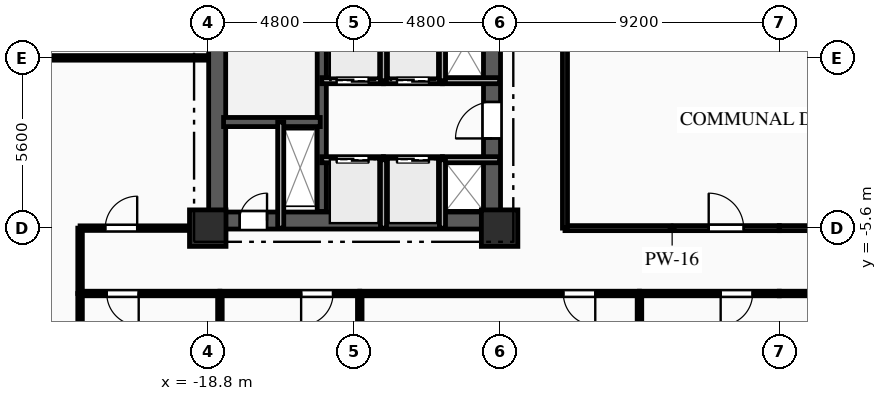
"""IFC4 building model, lengths in metres.
Left out: names, types, materials, properties, quantities, classifications, styles, units other than length and angle.
Written with IfcOpenShell. Run it as: python <this file> out.ifc"""

import sys

from ifc_helpers import new_model, si_unit, direction, frame, frame_2d, origin, origin_2d, place, context, subcontext, project, spatial, rectangle, extrude, element, fill, save


model = new_model("IFC4")
c1 = context("Model", 3, precision=1e-05, world=origin(), true_north=direction((0.0, 1.0)))
c2 = subcontext(c1, "Body", "Model", "MODEL_VIEW")
j1 = project(units=[si_unit("LENGTHUNIT", "METRE"), si_unit("PLANEANGLEUNIT", "RADIAN")], contexts=[c1])
p1 = place(None, origin())
s1 = spatial("IfcSite", under=j1, at=p1, CompositionType="ELEMENT")
p2 = place(p1, origin())
s2 = spatial("IfcBuilding", under=s1, at=p2, CompositionType="ELEMENT")
p3 = place(p2, frame((0.0, 0.0, 27.0)))
s3 = spatial("IfcBuildingStorey", under=s2, at=p3, CompositionType="ELEMENT", Elevation=27.0)
for number, where, z_axis, x_axis in (
    (1, (-18.8, -5.6, 0.0), (0.0, 0.0, 1.0), (1.0, 0.0, 0.0)),
    (2, (-9.2, -5.6, 0.0), (0.0, 0.0, 1.0), (1.0, 0.0, 0.0)),
):
    element("IfcColumn", number, at=place(p3, frame(where, z_axis=z_axis, x_axis=x_axis)), inside=s3, PredefinedType="COLUMN", context=c2, shape_type="SweptSolid", body=[
        extrude(rectangle(XDim=1.2, YDim=1.2, at=origin_2d()), origin(), (0.0, 0.0, 1.0), 3.35),
    ])
p4 = place(p3, frame((-18.8, -5.35, 0.0), z_axis=(0.0, 0.0, 1.0), x_axis=(1.0, 0.0, 0.0)))
e3 = element("IfcWall", 3, at=p4, inside=s3, PredefinedType="SHEAR", context=c2, shape_type="SweptSolid", body=[
    extrude(rectangle(XDim=9.6, YDim=0.56, at=frame_2d((4.8, 0.0))), origin(), (0.0, 0.0, 1.0), 3.035),
])
p5 = place(p4, frame((1.05, 0.0, 0.0)))
e4 = element("IfcOpeningElement", 4, at=p5, cuts=e3, PredefinedType="OPENING", context=c2, shape_type="SweptSolid", body=[
    extrude(rectangle(XDim=0.9, YDim=2.1, at=frame_2d((0.45, 1.05))), frame((0.0, 0.29, 0.0), z_axis=(0.0, -1.0, 0.0), x_axis=(1.0, 0.0, 0.0)), (0.0, 0.0, 1.0), 0.58),
])
p6 = place(p3, frame((-18.49, -5.05, 0.0), z_axis=(0.0, 0.0, 1.0), x_axis=(0.0, 1.0, 0.0)))
e5 = element("IfcWall", 5, at=p6, inside=s3, PredefinedType="SHEAR", context=c2, shape_type="SweptSolid", body=[
    extrude(rectangle(XDim=10.1, YDim=0.56, at=frame_2d((5.05, 0.0))), origin(), (0.0, 0.0, 1.0), 3.035),
])
p7 = place(p3, frame((-9.45, -5.05, 0.0), z_axis=(0.0, 0.0, 1.0), x_axis=(0.0, 1.0, 0.0)))
e6 = element("IfcWall", 6, at=p7, inside=s3, PredefinedType="SHEAR", context=c2, shape_type="SweptSolid", body=[
    extrude(rectangle(XDim=10.1, YDim=0.56, at=frame_2d((5.05, 0.0))), origin(), (0.0, 0.0, 1.0), 3.035),
])
p8 = place(p7, frame((7.15, 0.0, 0.0)))
e7 = element("IfcOpeningElement", 7, at=p8, cuts=e6, PredefinedType="OPENING", context=c2, shape_type="SweptSolid", body=[
    extrude(rectangle(XDim=0.9, YDim=2.1, at=frame_2d((0.45, 1.05))), frame((0.0, 0.29, 0.0), z_axis=(0.0, -1.0, 0.0), x_axis=(1.0, 0.0, 0.0)), (0.0, 0.0, 1.0), 0.58),
])
p9 = place(p7, frame((2.4, 0.0, 0.0)))
e8 = element("IfcOpeningElement", 8, at=p9, cuts=e6, PredefinedType="OPENING", context=c2, shape_type="SweptSolid", body=[
    extrude(rectangle(XDim=1.2, YDim=2.15, at=frame_2d((0.6, 1.075))), frame((0.0, 0.29, 0.0), z_axis=(0.0, -1.0, 0.0), x_axis=(1.0, 0.0, 0.0)), (0.0, 0.0, 1.0), 0.58),
])
p10 = place(p3, frame((-15.05, -5.05, 0.0), z_axis=(0.0, 0.0, 1.0), x_axis=(0.0, 1.0, 0.0)))
e9 = element("IfcWall", 9, at=p10, inside=s3, PredefinedType="SHEAR", context=c2, shape_type="SweptSolid", body=[
    extrude(rectangle(XDim=10.1, YDim=0.3, at=frame_2d((5.05, 0.0))), origin(), (0.0, 0.0, 1.0), 3.035),
])
p11 = place(p3, frame((-18.28, -2.11, 0.0), z_axis=(0.0, 0.0, 1.0), x_axis=(1.0, 0.0, 0.0)))
e10 = element("IfcWall", 10, at=p11, inside=s3, PredefinedType="SHEAR", context=c2, shape_type="SweptSolid", body=[
    extrude(rectangle(XDim=3.18, YDim=0.3, at=frame_2d((1.59, 0.0))), origin(), (0.0, 0.0, 1.0), 3.035),
])
p12 = place(p3, frame((-16.4, -5.6, 0.0), z_axis=(0.0, 0.0, 1.0), x_axis=(0.0, 1.0, 0.0)))
e11 = element("IfcWall", 11, at=p12, inside=s3, PredefinedType="PARTITIONING", context=c2, shape_type="SweptSolid", body=[
    extrude(rectangle(XDim=3.49, YDim=0.2, at=frame_2d((1.745, 0.0))), origin(), (0.0, 0.0, 1.0), 3.035),
])
p13 = place(p3, frame((-15.05, -3.35, 0.0), z_axis=(0.0, 0.0, 1.0), x_axis=(1.0, 0.0, 0.0)))
e12 = element("IfcWall", 12, at=p13, inside=s3, PredefinedType="PARTITIONING", context=c2, shape_type="SweptSolid", body=[
    extrude(rectangle(XDim=2.03, YDim=0.2, at=frame_2d((1.015, 0.0))), origin(), (0.0, 0.0, 1.0), 3.035),
])
p14 = place(p13, frame((0.49, 0.0, 0.0)))
e13 = element("IfcOpeningElement", 13, at=p14, cuts=e12, PredefinedType="OPENING", context=c2, shape_type="SweptSolid", body=[
    extrude(rectangle(XDim=1.05, YDim=2.1, at=frame_2d((0.525, 1.05))), frame((0.0, 0.11, 0.0), z_axis=(0.0, -1.0, 0.0), x_axis=(1.0, 0.0, 0.0)), (0.0, 0.0, 1.0), 0.22),
])
p15 = place(p3, frame((-13.02, -3.35, 0.0), z_axis=(0.0, 0.0, 1.0), x_axis=(1.0, 0.0, 0.0)))
e14 = element("IfcWall", 14, at=p15, inside=s3, PredefinedType="PARTITIONING", context=c2, shape_type="SweptSolid", body=[
    extrude(rectangle(XDim=1.94, YDim=0.2, at=frame_2d((0.97, 0.0))), origin(), (0.0, 0.0, 1.0), 3.035),
])
p16 = place(p15, frame((0.445, 0.0, 0.0)))
e15 = element("IfcOpeningElement", 15, at=p16, cuts=e14, PredefinedType="OPENING", context=c2, shape_type="SweptSolid", body=[
    extrude(rectangle(XDim=1.05, YDim=2.1, at=frame_2d((0.525, 1.05))), frame((0.0, 0.11, 0.0), z_axis=(0.0, -1.0, 0.0), x_axis=(1.0, 0.0, 0.0)), (0.0, 0.0, 1.0), 0.22),
])
p17 = place(p3, frame((-11.08, -3.35, 0.0), z_axis=(0.0, 0.0, 1.0), x_axis=(1.0, 0.0, 0.0)))
e16 = element("IfcWall", 16, at=p17, inside=s3, PredefinedType="PARTITIONING", context=c2, shape_type="SweptSolid", body=[
    extrude(rectangle(XDim=1.88, YDim=0.2, at=frame_2d((0.94, 0.0))), origin(), (0.0, 0.0, 1.0), 2.75),
])
p18 = place(p3, frame((-13.02, -0.75, 0.0), z_axis=(0.0, 0.0, 1.0), x_axis=(-1.0, 0.0, 0.0)))
e17 = element("IfcWall", 17, at=p18, inside=s3, PredefinedType="PARTITIONING", context=c2, shape_type="SweptSolid", body=[
    extrude(rectangle(XDim=2.03, YDim=0.2, at=frame_2d((1.015, 0.0))), origin(), (0.0, 0.0, 1.0), 3.035),
])
p19 = place(p18, frame((0.49, 0.0, 0.0)))
e18 = element("IfcOpeningElement", 18, at=p19, cuts=e17, PredefinedType="OPENING", context=c2, shape_type="SweptSolid", body=[
    extrude(rectangle(XDim=1.05, YDim=2.1, at=frame_2d((0.525, 1.05))), frame((0.0, 0.11, 0.0), z_axis=(0.0, -1.0, 0.0), x_axis=(1.0, 0.0, 0.0)), (0.0, 0.0, 1.0), 0.22),
])
p20 = place(p3, frame((-11.08, -0.75, 0.0), z_axis=(0.0, 0.0, 1.0), x_axis=(-1.0, 0.0, 0.0)))
e19 = element("IfcWall", 19, at=p20, inside=s3, PredefinedType="PARTITIONING", context=c2, shape_type="SweptSolid", body=[
    extrude(rectangle(XDim=1.94, YDim=0.2, at=frame_2d((0.97, 0.0))), origin(), (0.0, 0.0, 1.0), 3.035),
])
p21 = place(p20, frame((0.445, 0.0, 0.0)))
e20 = element("IfcOpeningElement", 20, at=p21, cuts=e19, PredefinedType="OPENING", context=c2, shape_type="SweptSolid", body=[
    extrude(rectangle(XDim=1.05, YDim=2.1, at=frame_2d((0.525, 1.05))), frame((0.0, 0.11, 0.0), z_axis=(0.0, -1.0, 0.0), x_axis=(1.0, 0.0, 0.0)), (0.0, 0.0, 1.0), 0.22),
])
p22 = place(p3, frame((-9.2, -0.75, 0.0), z_axis=(0.0, 0.0, 1.0), x_axis=(-1.0, 0.0, 0.0)))
e21 = element("IfcWall", 21, at=p22, inside=s3, PredefinedType="PARTITIONING", context=c2, shape_type="SweptSolid", body=[
    extrude(rectangle(XDim=1.88, YDim=0.2, at=frame_2d((0.94, 0.0))), origin(), (0.0, 0.0, 1.0), 3.035),
])
for number, where, z_axis, x_axis in (
    (22, (-13.02, -5.6, 0.0), (0.0, 0.0, 1.0), (0.0, 1.0, 0.0)),
    (23, (-11.08, -5.6, 0.0), (0.0, 0.0, 1.0), (0.0, 1.0, 0.0)),
):
    element("IfcWall", number, at=place(p3, frame(where, z_axis=z_axis, x_axis=x_axis)), inside=s3, PredefinedType="PARTITIONING", context=c2, shape_type="SweptSolid", body=[
        extrude(rectangle(XDim=2.25, YDim=0.2, at=frame_2d((1.125, 0.0))), origin(), (0.0, 0.0, 1.0), 3.035),
    ])
for number, where, z_axis, x_axis in (
    (24, (-13.02, -0.75, 0.0), (0.0, 0.0, 1.0), (0.0, 1.0, 0.0)),
    (25, (-11.08, -0.75, 0.0), (0.0, 0.0, 1.0), (0.0, 1.0, 0.0)),
):
    element("IfcWall", number, at=place(p3, frame(where, z_axis=z_axis, x_axis=x_axis)), inside=s3, PredefinedType="PARTITIONING", context=c2, shape_type="SweptSolid", body=[
        extrude(rectangle(XDim=2.3, YDim=0.2, at=frame_2d((1.15, 0.0))), origin(), (0.0, 0.0, 1.0), 3.035),
    ])
p23 = place(p3, frame((-23.0, -5.6, 0.0), z_axis=(0.0, 0.0, 1.0), x_axis=(1.0, 0.0, 0.0)))
e26 = element("IfcWall", 26, at=p23, inside=s3, PredefinedType="PARTITIONING", context=c2, shape_type="SweptSolid", body=[
    extrude(rectangle(XDim=4.2, YDim=0.15, at=frame_2d((2.1, 0.0))), origin(), (0.0, 0.0, 1.0), 3.035),
])
p24 = place(p23, frame((0.829, 0.0, 0.0)))
e27 = element("IfcOpeningElement", 27, at=p24, cuts=e26, PredefinedType="OPENING", context=c2, shape_type="SweptSolid", body=[
    extrude(rectangle(XDim=1.05, YDim=2.15, at=frame_2d((0.525, 1.075))), frame((0.0, 0.085, 0.0), z_axis=(0.0, -1.0, 0.0), x_axis=(1.0, 0.0, 0.0)), (0.0, 0.0, 1.0), 0.17),
])
p25 = place(p3, frame((-23.0, -7.75, 0.0), z_axis=(0.0, 0.0, 1.0), x_axis=(0.0, 1.0, 0.0)))
e28 = element("IfcWall", 28, at=p25, inside=s3, PredefinedType="PARTITIONING", context=c2, shape_type="SweptSolid", body=[
    extrude(rectangle(XDim=2.15, YDim=0.15, at=frame_2d((1.075, 0.0))), origin(), (0.0, 0.0, 1.0), 3.035),
])
p26 = place(p3, frame((-18.4, -7.75, 0.0), z_axis=(0.0, 0.0, 1.0), x_axis=(-1.0, 0.0, 0.0)))
e29 = element("IfcWall", 29, at=p26, inside=s3, PredefinedType="PARTITIONING", context=c2, shape_type="SweptSolid", body=[
    extrude(rectangle(XDim=4.6, YDim=0.15, at=frame_2d((2.3, 0.0))), origin(), (0.0, 0.0, 1.0), 3.035),
])
p27 = place(p26, frame((2.671, 0.0, 0.0)))
e30 = element("IfcOpeningElement", 30, at=p27, cuts=e29, PredefinedType="OPENING", context=c2, shape_type="SweptSolid", body=[
    extrude(rectangle(XDim=1.05, YDim=2.15, at=frame_2d((0.525, 1.075))), frame((0.0, 0.085, 0.0), z_axis=(0.0, -1.0, 0.0), x_axis=(1.0, 0.0, 0.0)), (0.0, 0.0, 1.0), 0.17),
])
p28 = place(p3, frame((-13.8, -7.75, 0.0), z_axis=(0.0, 0.0, 1.0), x_axis=(-1.0, 0.0, 0.0)))
e31 = element("IfcWall", 31, at=p28, inside=s3, PredefinedType="PARTITIONING", context=c2, shape_type="SweptSolid", body=[
    extrude(rectangle(XDim=4.6, YDim=0.15, at=frame_2d((2.3, 0.0))), origin(), (0.0, 0.0, 1.0), 3.035),
])
p29 = place(p28, frame((0.879, 0.0, 0.0)))
e32 = element("IfcOpeningElement", 32, at=p29, cuts=e31, PredefinedType="OPENING", context=c2, shape_type="SweptSolid", body=[
    extrude(rectangle(XDim=1.05, YDim=2.15, at=frame_2d((0.525, 1.075))), frame((0.0, 0.085, 0.0), z_axis=(0.0, -1.0, 0.0), x_axis=(1.0, 0.0, 0.0)), (0.0, 0.0, 1.0), 0.17),
])
p30 = place(p3, frame((-4.6, -7.75, 0.0), z_axis=(0.0, 0.0, 1.0), x_axis=(-1.0, 0.0, 0.0)))
e33 = element("IfcWall", 33, at=p30, inside=s3, PredefinedType="PARTITIONING", context=c2, shape_type="SweptSolid", body=[
    extrude(rectangle(XDim=9.2, YDim=0.15, at=frame_2d((4.6, 0.0))), origin(), (0.0, 0.0, 1.0), 3.035),
])
p31 = place(p30, frame((1.454, 0.0, 0.0)))
e34 = element("IfcOpeningElement", 34, at=p31, cuts=e33, PredefinedType="OPENING", context=c2, shape_type="SweptSolid", body=[
    extrude(rectangle(XDim=1.05, YDim=2.15, at=frame_2d((0.525, 1.075))), frame((0.0, 0.085, 0.0), z_axis=(0.0, -1.0, 0.0), x_axis=(1.0, 0.0, 0.0)), (0.0, 0.0, 1.0), 0.17),
])
p32 = place(p3, frame((0.0, -7.75, 0.0), z_axis=(0.0, 0.0, 1.0), x_axis=(-1.0, 0.0, 0.0)))
e35 = element("IfcWall", 35, at=p32, inside=s3, PredefinedType="PARTITIONING", context=c2, shape_type="SweptSolid", body=[
    extrude(rectangle(XDim=4.6, YDim=0.15, at=frame_2d((2.3, 0.0))), origin(), (0.0, 0.0, 1.0), 3.035),
])
p33 = place(p32, frame((0.879, 0.0, 0.0)))
e36 = element("IfcOpeningElement", 36, at=p33, cuts=e35, PredefinedType="OPENING", context=c2, shape_type="SweptSolid", body=[
    extrude(rectangle(XDim=1.05, YDim=2.15, at=frame_2d((0.525, 1.075))), frame((0.0, 0.085, 0.0), z_axis=(0.0, -1.0, 0.0), x_axis=(1.0, 0.0, 0.0)), (0.0, 0.0, 1.0), 0.17),
])
p34 = place(p3, frame((-7.05, -5.6, 0.0), z_axis=(0.0, 0.0, 1.0), x_axis=(1.0, 0.0, 0.0)))
e37 = element("IfcWall", 37, at=p34, inside=s3, PredefinedType="PARTITIONING", context=c2, shape_type="SweptSolid", body=[
    extrude(rectangle(XDim=7.05, YDim=0.165, at=frame_2d((3.525, 0.0))), origin(), (0.0, 0.0, 1.0), 2.52),
])
p35 = place(p34, frame((4.728, 0.0, 0.0)))
e38 = element("IfcOpeningElement", 38, at=p35, cuts=e37, PredefinedType="OPENING", context=c2, shape_type="SweptSolid", body=[
    extrude(rectangle(XDim=1.15, YDim=2.15, at=frame_2d((0.575, 1.075))), frame((0.0, 0.093, 0.0), z_axis=(0.0, -1.0, 0.0), x_axis=(1.0, 0.0, 0.0)), (0.0, 0.0, 1.0), 0.185),
])
p36 = place(p3, frame((4.6, -7.75, 0.0), z_axis=(0.0, 0.0, 1.0), x_axis=(-1.0, 0.0, 0.0)))
e39 = element("IfcWall", 39, at=p36, inside=s3, PredefinedType="PARTITIONING", context=c2, shape_type="SweptSolid", body=[
    extrude(rectangle(XDim=4.6, YDim=0.15, at=frame_2d((2.3, 0.0))), origin(), (0.0, 0.0, 1.0), 3.035),
])
p37 = place(p3, frame((0.0, -5.6, 0.0), z_axis=(0.0, 0.0, 1.0), x_axis=(1.0, 0.0, 0.0)))
e40 = element("IfcWall", 40, at=p37, inside=s3, PredefinedType="PARTITIONING", context=c2, shape_type="SweptSolid", body=[
    extrude(rectangle(XDim=7.05, YDim=0.165, at=frame_2d((3.525, 0.0))), origin(), (0.0, 0.0, 1.0), 2.52),
])
p38 = place(p3, frame((-7.05, 1.45, 0.0), z_axis=(0.0, 0.0, 1.0), x_axis=(0.0, -1.0, 0.0)))
e41 = element("IfcWall", 41, at=p38, inside=s3, PredefinedType="PARTITIONING", context=c2, shape_type="SweptSolid", body=[
    extrude(rectangle(XDim=7.05, YDim=0.165, at=frame_2d((3.525, 0.0))), origin(), (0.0, 0.0, 1.0), 3.035),
])
p39 = place(p3, frame((-32.8, 0.0, 0.0), z_axis=(0.0, 0.0, 1.0), x_axis=(1.0, 0.0, 0.0)))
e42 = element("IfcWall", 42, at=p39, inside=s3, PredefinedType="PARTITIONING", context=c2, shape_type="SweptSolid", body=[
    extrude(rectangle(XDim=14.0, YDim=0.15, at=frame_2d((7.0, 0.0))), origin(), (0.0, 0.0, 1.0), 3.035),
])
for number, where, z_axis, x_axis in (
    (43, (-23.0, -7.75, 0.0), (0.0, 0.0, 1.0), (0.0, -1.0, 0.0)),
    (44, (-18.4, -7.75, 0.0), (0.0, 0.0, 1.0), (0.0, -1.0, 0.0)),
    (45, (-13.8, -7.75, 0.0), (0.0, 0.0, 1.0), (0.0, -1.0, 0.0)),
    (46, (-4.6, -7.75, 0.0), (0.0, 0.0, 1.0), (0.0, -1.0, 0.0)),
):
    element("IfcWall", number, at=place(p3, frame(where, z_axis=z_axis, x_axis=x_axis)), inside=s3, PredefinedType="PARTITIONING", context=c2, shape_type="SweptSolid", body=[
        extrude(rectangle(XDim=11.65, YDim=0.15, at=frame_2d((5.825, 0.0))), origin(), (0.0, 0.0, 1.0), 3.035),
    ])
p40 = place(p5, origin())
e47 = element("IfcDoor", 47, at=p40, inside=s3, OperationType="SINGLE_SWING_RIGHT", PredefinedType="DOOR", context=c2, shape_type="SweptSolid", body=[
    extrude(rectangle(XDim=0.9, YDim=2.1, at=frame_2d((0.45, 1.05))), frame((0.0, 0.025, 0.0), z_axis=(0.0, -1.0, 0.0), x_axis=(1.0, 0.0, 0.0)), (0.0, 0.0, 1.0), 0.05),
])
fill(e4, e47)
p41 = place(p14, origin())
e48 = element("IfcDoor", 48, at=p41, inside=s3, OperationType="DOUBLE_DOOR_SLIDING", PredefinedType="DOOR", context=c2, shape_type="SweptSolid", body=[
    extrude(rectangle(XDim=1.05, YDim=2.1, at=frame_2d((0.525, 1.05))), frame((0.0, 0.025, 0.0), z_axis=(0.0, -1.0, 0.0), x_axis=(1.0, 0.0, 0.0)), (0.0, 0.0, 1.0), 0.05),
])
fill(e13, e48)
p42 = place(p16, origin())
e49 = element("IfcDoor", 49, at=p42, inside=s3, OperationType="DOUBLE_DOOR_SLIDING", PredefinedType="DOOR", context=c2, shape_type="SweptSolid", body=[
    extrude(rectangle(XDim=1.05, YDim=2.1, at=frame_2d((0.525, 1.05))), frame((0.0, 0.025, 0.0), z_axis=(0.0, -1.0, 0.0), x_axis=(1.0, 0.0, 0.0)), (0.0, 0.0, 1.0), 0.05),
])
fill(e15, e49)
p43 = place(p19, origin())
e50 = element("IfcDoor", 50, at=p43, inside=s3, OperationType="DOUBLE_DOOR_SLIDING", PredefinedType="DOOR", context=c2, shape_type="SweptSolid", body=[
    extrude(rectangle(XDim=1.05, YDim=2.1, at=frame_2d((0.525, 1.05))), frame((0.0, 0.025, 0.0), z_axis=(0.0, -1.0, 0.0), x_axis=(1.0, 0.0, 0.0)), (0.0, 0.0, 1.0), 0.05),
])
fill(e18, e50)
p44 = place(p21, origin())
e51 = element("IfcDoor", 51, at=p44, inside=s3, OperationType="DOUBLE_DOOR_SLIDING", PredefinedType="DOOR", context=c2, shape_type="SweptSolid", body=[
    extrude(rectangle(XDim=1.05, YDim=2.1, at=frame_2d((0.525, 1.05))), frame((0.0, 0.025, 0.0), z_axis=(0.0, -1.0, 0.0), x_axis=(1.0, 0.0, 0.0)), (0.0, 0.0, 1.0), 0.05),
])
fill(e20, e51)
p45 = place(p9, origin())
e52 = element("IfcDoor", 52, at=p45, inside=s3, OperationType="SINGLE_SWING_LEFT", PredefinedType="DOOR", context=c2, shape_type="SweptSolid", body=[
    extrude(rectangle(XDim=1.2, YDim=2.15, at=frame_2d((0.6, 1.075))), frame((0.0, 0.025, 0.0), z_axis=(0.0, -1.0, 0.0), x_axis=(1.0, 0.0, 0.0)), (0.0, 0.0, 1.0), 0.05),
])
fill(e8, e52)
p46 = place(p24, origin())
e53 = element("IfcDoor", 53, at=p46, inside=s3, OperationType="SINGLE_SWING_RIGHT", PredefinedType="DOOR", context=c2, shape_type="SweptSolid", body=[
    extrude(rectangle(XDim=1.05, YDim=2.15, at=frame_2d((0.525, 1.075))), frame((0.0, 0.025, 0.0), z_axis=(0.0, -1.0, 0.0), x_axis=(1.0, 0.0, 0.0)), (0.0, 0.0, 1.0), 0.05),
])
fill(e27, e53)
p47 = place(p27, origin())
e54 = element("IfcDoor", 54, at=p47, inside=s3, OperationType="SINGLE_SWING_LEFT", PredefinedType="DOOR", context=c2, shape_type="SweptSolid", body=[
    extrude(rectangle(XDim=1.05, YDim=2.15, at=frame_2d((0.525, 1.075))), frame((0.0, 0.025, 0.0), z_axis=(0.0, -1.0, 0.0), x_axis=(1.0, 0.0, 0.0)), (0.0, 0.0, 1.0), 0.05),
])
fill(e30, e54)
p48 = place(p29, origin())
e55 = element("IfcDoor", 55, at=p48, inside=s3, OperationType="SINGLE_SWING_RIGHT", PredefinedType="DOOR", context=c2, shape_type="SweptSolid", body=[
    extrude(rectangle(XDim=1.05, YDim=2.15, at=frame_2d((0.525, 1.075))), frame((0.0, 0.025, 0.0), z_axis=(0.0, -1.0, 0.0), x_axis=(1.0, 0.0, 0.0)), (0.0, 0.0, 1.0), 0.05),
])
fill(e32, e55)
p49 = place(p31, origin())
e56 = element("IfcDoor", 56, at=p49, inside=s3, OperationType="SINGLE_SWING_LEFT", PredefinedType="DOOR", context=c2, shape_type="SweptSolid", body=[
    extrude(rectangle(XDim=1.05, YDim=2.15, at=frame_2d((0.525, 1.075))), frame((0.0, 0.025, 0.0), z_axis=(0.0, -1.0, 0.0), x_axis=(1.0, 0.0, 0.0)), (0.0, 0.0, 1.0), 0.05),
])
fill(e34, e56)
p50 = place(p33, origin())
e57 = element("IfcDoor", 57, at=p50, inside=s3, OperationType="SINGLE_SWING_RIGHT", PredefinedType="DOOR", context=c2, shape_type="SweptSolid", body=[
    extrude(rectangle(XDim=1.05, YDim=2.15, at=frame_2d((0.525, 1.075))), frame((0.0, 0.025, 0.0), z_axis=(0.0, -1.0, 0.0), x_axis=(1.0, 0.0, 0.0)), (0.0, 0.0, 1.0), 0.05),
])
fill(e36, e57)
p51 = place(p35, origin())
e58 = element("IfcDoor", 58, at=p51, inside=s3, OperationType="SINGLE_SWING_LEFT", PredefinedType="DOOR", context=c2, shape_type="SweptSolid", body=[
    extrude(rectangle(XDim=1.15, YDim=2.15, at=frame_2d((0.575, 1.075))), frame((0.0, 0.025, 0.0), z_axis=(0.0, -1.0, 0.0), x_axis=(1.0, 0.0, 0.0)), (0.0, 0.0, 1.0), 0.05),
])
fill(e38, e58)
save(model, sys.argv[1])
